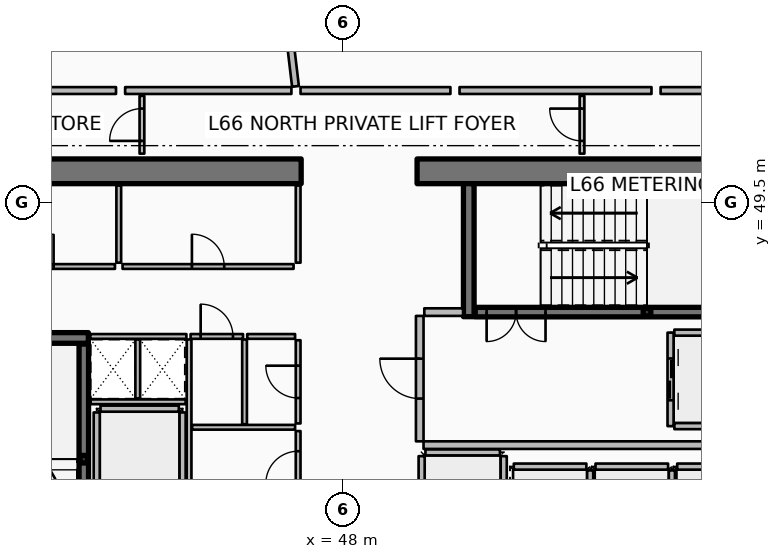
"""IFC4 building model, lengths in metres.
Left out: names, types, materials, properties, quantities, classifications, styles, units other than length and angle.
Written with IfcOpenShell. Run it as: python <this file> out.ifc"""

import sys

from ifc_helpers import new_model, si_unit, direction, frame, frame_2d, origin, origin_2d, place, context, subcontext, project, spatial, rectangle, hollow_rectangle, extrude, element, fill, save


model = new_model("IFC4")
c1 = context("Model", 3, precision=1e-05, world=origin(), true_north=direction((0.0, 1.0)))
c2 = subcontext(c1, "Body", "Model", "MODEL_VIEW")
j1 = project(units=[si_unit("LENGTHUNIT", "METRE"), si_unit("PLANEANGLEUNIT", "RADIAN")], contexts=[c1])
p1 = place(None, origin())
s1 = spatial("IfcSite", under=j1, at=p1, CompositionType="ELEMENT")
p2 = place(p1, origin())
s2 = spatial("IfcBuilding", under=s1, at=p2, CompositionType="ELEMENT")
p3 = place(p2, frame((0.0, 0.0, 263.65)))
s3 = spatial("IfcBuildingStorey", under=s2, at=p3, CompositionType="ELEMENT", Elevation=263.65)
for number, where, z_axis, x_axis in (
    (1, (37.15, 50.325, 0.0), (0.0, 0.0, 1.0), (1.0, 0.0, 0.0)),
    (2, (49.95, 50.325, 0.0), (0.0, 0.0, 1.0), (1.0, 0.0, 0.0)),
):
    element("IfcWall", number, at=place(p3, frame(where, z_axis=z_axis, x_axis=x_axis)), inside=s3, PredefinedType="SHEAR", context=c2, shape_type="SweptSolid", body=[
        extrude(rectangle(XDim=9.75, YDim=0.65, at=frame_2d((4.875, 0.0))), origin(), (0.0, 0.0, 1.0), 3.85),
    ])
for number, where, z_axis, x_axis in (
    (3, (37.8, 45.94, 0.0), (0.0, 0.0, 1.0), (1.0, 0.0, 0.0)),
    (4, (51.31, 46.5, 0.0), (0.0, 0.0, 1.0), (0.0, 1.0, 0.0)),
):
    element("IfcWall", number, at=place(p3, frame(where, z_axis=z_axis, x_axis=x_axis)), inside=s3, PredefinedType="SHEAR", context=c2, shape_type="SweptSolid", body=[
        extrude(rectangle(XDim=3.5, YDim=0.28, at=frame_2d((1.75, 0.0))), origin(), (0.0, 0.0, 1.0), 3.85),
    ])
for number, where, z_axis, x_axis in (
    (5, (41.18, 42.75, 0.0), (0.0, 0.0, 1.0), (1.0, 0.0, 0.0)),
    (6, (56.0, 46.62, 0.0), (0.0, 0.0, 1.0), (1.0, 0.0, 0.0)),
):
    element("IfcColumn", number, at=place(p3, frame(where, z_axis=z_axis, x_axis=x_axis)), inside=s3, PredefinedType="COLUMN", context=c2, shape_type="SweptSolid", body=[
        extrude(hollow_rectangle(XDim=0.2, YDim=0.2, WallThickness=0.01, InnerFilletRadius=0.01, OuterFilletRadius=0.02, at=origin_2d()), origin(), (0.0, 0.0, 1.0), 1.72),
    ])
p4 = place(p3, frame((41.18, 38.22, 0.0), z_axis=(0.0, 0.0, 1.0), x_axis=(0.0, 1.0, 0.0)))
e7 = element("IfcWall", 7, at=p4, inside=s3, PredefinedType="SOLIDWALL", context=c2, shape_type="SweptSolid", body=[
    extrude(rectangle(XDim=7.56, YDim=0.25, at=frame_2d((3.78, 0.0))), origin(), (0.0, 0.0, 1.0), 3.59),
])
p5 = place(p4, frame((0.3, 0.0, 0.0)))
e8 = element("IfcOpeningElement", 8, at=p5, cuts=e7, PredefinedType="OPENING", context=c2, shape_type="SweptSolid", body=[
    extrude(rectangle(XDim=1.55, YDim=2.15, at=frame_2d((0.775, 1.075))), frame((0.0, 0.135, 0.0), z_axis=(0.0, -1.0, 0.0), x_axis=(1.0, 0.0, 0.0)), (0.0, 0.0, 1.0), 0.27),
])
p6 = place(p3, frame((51.48, 46.62, 0.0), z_axis=(0.0, 0.0, 1.0), x_axis=(1.0, 0.0, 0.0)))
e9 = element("IfcWall", 9, at=p6, inside=s3, PredefinedType="SOLIDWALL", context=c2, shape_type="SweptSolid", body=[
    extrude(rectangle(XDim=7.54, YDim=0.25, at=frame_2d((3.77, 0.0))), origin(), (0.0, 0.0, 1.0), 3.59),
])
p7 = place(p6, frame((0.3, 0.0, 0.0)))
e10 = element("IfcOpeningElement", 10, at=p7, cuts=e9, PredefinedType="OPENING", context=c2, shape_type="SweptSolid", body=[
    extrude(rectangle(XDim=1.55, YDim=2.15, at=frame_2d((0.775, 1.075))), frame((0.0, 0.135, 0.0), z_axis=(0.0, -1.0, 0.0), x_axis=(1.0, 0.0, 0.0)), (0.0, 0.0, 1.0), 0.27),
])
p8 = place(p3, frame((54.505, 40.845, 0.0), z_axis=(0.0, 0.0, 1.0), x_axis=(0.0, 1.0, 0.0)))
e11 = element("IfcWall", 11, at=p8, inside=s3, PredefinedType="PARTITIONING", context=c2, shape_type="SweptSolid", body=[
    extrude(rectangle(XDim=1.61, YDim=0.16, at=frame_2d((0.805, 0.0))), origin(), (0.0, 0.0, 1.0), 3.59),
])
p9 = place(p3, frame((52.495, 42.555, 0.0), z_axis=(0.0, 0.0, 1.0), x_axis=(1.0, 0.0, 0.0)))
e12 = element("IfcWall", 12, at=p9, inside=s3, PredefinedType="PARTITIONING", context=c2, shape_type="SweptSolid", body=[
    extrude(rectangle(XDim=1.91, YDim=0.16, at=frame_2d((0.955, 0.0))), origin(), (0.0, 0.0, 1.0), 3.59),
])
p10 = place(p3, frame((56.655, 40.845, 0.0), z_axis=(0.0, 0.0, 1.0), x_axis=(0.0, 1.0, 0.0)))
e13 = element("IfcWall", 13, at=p10, inside=s3, PredefinedType="PARTITIONING", context=c2, shape_type="SweptSolid", body=[
    extrude(rectangle(XDim=1.61, YDim=0.16, at=frame_2d((0.805, 0.0))), origin(), (0.0, 0.0, 1.0), 3.59),
])
p11 = place(p3, frame((54.645, 42.555, 0.0), z_axis=(0.0, 0.0, 1.0), x_axis=(1.0, 0.0, 0.0)))
e14 = element("IfcWall", 14, at=p11, inside=s3, PredefinedType="PARTITIONING", context=c2, shape_type="SweptSolid", body=[
    extrude(rectangle(XDim=1.91, YDim=0.16, at=frame_2d((0.955, 0.0))), origin(), (0.0, 0.0, 1.0), 3.59),
])
p12 = place(p3, frame((56.795, 42.555, 0.0), z_axis=(0.0, 0.0, 1.0), x_axis=(1.0, 0.0, 0.0)))
e15 = element("IfcWall", 15, at=p12, inside=s3, PredefinedType="PARTITIONING", context=c2, shape_type="SweptSolid", body=[
    extrude(rectangle(XDim=1.91, YDim=0.16, at=frame_2d((0.955, 0.0))), origin(), (0.0, 0.0, 1.0), 3.59),
])
for number, where, z_axis, x_axis in (
    (16, (43.78, 41.72, 0.0), (0.0, 0.0, 1.0), (0.0, 1.0, 0.0)),
    (17, (41.52, 41.72, 0.0), (0.0, 0.0, 1.0), (0.0, 1.0, 0.0)),
):
    element("IfcWall", number, at=place(p3, frame(where, z_axis=z_axis, x_axis=x_axis)), inside=s3, PredefinedType="PARTITIONING", context=c2, shape_type="SweptSolid", body=[
        extrude(rectangle(XDim=2.26, YDim=0.16, at=frame_2d((1.13, 0.0))), origin(), (0.0, 0.0, 1.0), 3.59),
    ])
p13 = place(p3, frame((41.62, 44.08, 0.0), z_axis=(0.0, 0.0, 1.0), x_axis=(1.0, 0.0, 0.0)))
e18 = element("IfcWall", 18, at=p13, inside=s3, PredefinedType="PARTITIONING", context=c2, shape_type="SweptSolid", body=[
    extrude(rectangle(XDim=2.06, YDim=0.16, at=frame_2d((1.03, 0.0))), origin(), (0.0, 0.0, 1.0), 3.59),
])
p14 = place(p3, frame((56.62, 46.08, 0.0), z_axis=(0.0, 0.0, 1.0), x_axis=(0.0, -1.0, 0.0)))
e19 = element("IfcWall", 19, at=p14, inside=s3, PredefinedType="PARTITIONING", context=c2, shape_type="SweptSolid", body=[
    extrude(rectangle(XDim=2.46, YDim=0.16, at=frame_2d((1.23, 0.0))), origin(), (0.0, 0.0, 1.0), 3.59),
])
p15 = place(p14, frame((0.68, 0.0, 0.0)))
e20 = element("IfcOpeningElement", 20, at=p15, cuts=e19, PredefinedType="OPENING", context=c2, shape_type="SweptSolid", body=[
    extrude(rectangle(XDim=1.1, YDim=2.1, at=frame_2d((0.55, 1.05))), frame((0.0, 0.09, 0.0), z_axis=(0.0, -1.0, 0.0), x_axis=(1.0, 0.0, 0.0)), (0.0, 0.0, 1.0), 0.18),
])
for number, where, z_axis, x_axis in (
    (21, (56.72, 46.08, 0.0), (0.0, 0.0, 1.0), (1.0, 0.0, 0.0)),
    (22, (56.72, 43.62, 0.0), (0.0, 0.0, 1.0), (1.0, 0.0, 0.0)),
):
    element("IfcWall", number, at=place(p3, frame(where, z_axis=z_axis, x_axis=x_axis)), inside=s3, PredefinedType="PARTITIONING", context=c2, shape_type="SweptSolid", body=[
        extrude(rectangle(XDim=2.06, YDim=0.16, at=frame_2d((1.03, 0.0))), origin(), (0.0, 0.0, 1.0), 3.59),
    ])
for number, where, z_axis, x_axis in (
    (23, (52.23, 40.67, 0.0), (0.0, 0.0, 1.0), (0.0, 1.0, 0.0)),
    (24, (50.07, 40.67, 0.0), (0.0, 0.0, 1.0), (0.0, 1.0, 0.0)),
):
    element("IfcWall", number, at=place(p3, frame(where, z_axis=z_axis, x_axis=x_axis)), inside=s3, PredefinedType="PARTITIONING", context=c2, shape_type="SweptSolid", body=[
        extrude(rectangle(XDim=2.16, YDim=0.16, at=frame_2d((1.08, 0.0))), origin(), (0.0, 0.0, 1.0), 3.59),
    ])
p16 = place(p3, frame((50.17, 42.93, 0.0), z_axis=(0.0, 0.0, 1.0), x_axis=(1.0, 0.0, 0.0)))
e25 = element("IfcWall", 25, at=p16, inside=s3, PredefinedType="PARTITIONING", context=c2, shape_type="SweptSolid", body=[
    extrude(rectangle(XDim=1.96, YDim=0.16, at=frame_2d((0.98, 0.0))), origin(), (0.0, 0.0, 1.0), 3.59),
])
for number, where, z_axis, x_axis in (
    (26, (46.82, 47.92, 0.0), (0.0, 0.0, 1.0), (0.0, 1.0, 0.0)),
    (27, (42.1, 47.92, 0.0), (0.0, 0.0, 1.0), (0.0, 1.0, 0.0)),
):
    element("IfcWall", number, at=place(p3, frame(where, z_axis=z_axis, x_axis=x_axis)), inside=s3, PredefinedType="PARTITIONING", context=c2, shape_type="SweptSolid", body=[
        extrude(rectangle(XDim=2.03, YDim=0.125, at=frame_2d((1.015, 0.0))), origin(), (0.0, 0.0, 1.0), 3.03),
    ])
p17 = place(p3, frame((37.92, 47.82, 0.0), z_axis=(0.0, 0.0, 1.0), x_axis=(1.0, 0.0, 0.0)))
e28 = element("IfcWall", 28, at=p17, inside=s3, PredefinedType="PARTITIONING", context=c2, shape_type="SweptSolid", body=[
    extrude(rectangle(XDim=4.08, YDim=0.125, at=frame_2d((2.04, 0.0))), origin(), (0.0, 0.0, 1.0), 3.03),
])
p18 = place(p17, frame((1.615, 0.0, 0.0)))
e29 = element("IfcOpeningElement", 29, at=p18, cuts=e28, PredefinedType="OPENING", context=c2, shape_type="SweptSolid", body=[
    extrude(rectangle(XDim=0.85, YDim=2.06, at=frame_2d((0.425, 1.03))), frame((0.0, 0.073, 0.0), z_axis=(0.0, -1.0, 0.0), x_axis=(1.0, 0.0, 0.0)), (0.0, 0.0, 1.0), 0.145),
])
p19 = place(p3, frame((42.2, 47.82, 0.0), z_axis=(0.0, 0.0, 1.0), x_axis=(1.0, 0.0, 0.0)))
e30 = element("IfcWall", 30, at=p19, inside=s3, PredefinedType="PARTITIONING", context=c2, shape_type="SweptSolid", body=[
    extrude(rectangle(XDim=4.5, YDim=0.125, at=frame_2d((2.25, 0.0))), origin(), (0.0, 0.0, 1.0), 3.03),
])
p20 = place(p19, frame((1.825, 0.0, 0.0)))
e31 = element("IfcOpeningElement", 31, at=p20, cuts=e30, PredefinedType="OPENING", context=c2, shape_type="SweptSolid", body=[
    extrude(rectangle(XDim=0.85, YDim=2.06, at=frame_2d((0.425, 1.03))), frame((0.0, 0.073, 0.0), z_axis=(0.0, -1.0, 0.0), x_axis=(1.0, 0.0, 0.0)), (0.0, 0.0, 1.0), 0.145),
])
p21 = place(p3, frame((50.12, 43.12, 0.0), z_axis=(0.0, 0.0, 1.0), x_axis=(1.0, 0.0, 0.0)))
e32 = element("IfcWall", 32, at=p21, inside=s3, PredefinedType="PARTITIONING", context=c2, shape_type="SweptSolid", body=[
    extrude(rectangle(XDim=8.88, YDim=0.2, at=frame_2d((4.44, 0.0))), origin(), (0.0, 0.0, 1.0), 3.59),
])
p22 = place(p3, frame((50.14, 46.62, 0.0), z_axis=(0.0, 0.0, 1.0), x_axis=(1.0, 0.0, 0.0)))
e33 = element("IfcWall", 33, at=p22, inside=s3, PredefinedType="PARTITIONING", context=c2, shape_type="SweptSolid", body=[
    extrude(rectangle(XDim=1.02, YDim=0.2, at=frame_2d((0.51, 0.0))), origin(), (0.0, 0.0, 1.0), 3.59),
])
p23 = place(p3, frame((50.02, 43.22, 0.0), z_axis=(0.0, 0.0, 1.0), x_axis=(0.0, 1.0, 0.0)))
e34 = element("IfcWall", 34, at=p23, inside=s3, PredefinedType="PARTITIONING", context=c2, shape_type="SweptSolid", body=[
    extrude(rectangle(XDim=3.3, YDim=0.2, at=frame_2d((1.65, 0.0))), origin(), (0.0, 0.0, 1.0), 3.59),
])
p24 = place(p23, frame((1.125, 0.0, 0.0)))
e35 = element("IfcOpeningElement", 35, at=p24, cuts=e34, PredefinedType="OPENING", context=c2, shape_type="SweptSolid", body=[
    extrude(rectangle(XDim=1.05, YDim=2.1, at=frame_2d((0.525, 1.05))), frame((0.0, 0.11, 0.0), z_axis=(0.0, -1.0, 0.0), x_axis=(1.0, 0.0, 0.0)), (0.0, 0.0, 1.0), 0.22),
])
p25 = place(p3, frame((41.36, 44.26, 0.0), z_axis=(0.0, 0.0, 1.0), x_axis=(1.0, 0.0, 0.0)))
e36 = element("IfcWall", 36, at=p25, inside=s3, PredefinedType="PARTITIONING", context=c2, shape_type="SweptSolid", body=[
    extrude(rectangle(XDim=2.5, YDim=0.125, at=frame_2d((1.25, 0.0))), origin(), (0.0, 0.0, 1.0), 3.03),
])
p26 = place(p3, frame((42.6, 44.35, 0.0), z_axis=(0.0, 0.0, 1.0), x_axis=(0.0, 1.0, 0.0)))
e37 = element("IfcWall", 37, at=p26, inside=s3, PredefinedType="PARTITIONING", context=c2, shape_type="SweptSolid", body=[
    extrude(rectangle(XDim=1.55, YDim=0.125, at=frame_2d((0.775, 0.0))), origin(), (0.0, 0.0, 1.0), 3.03),
])
p27 = place(p3, frame((43.95, 41.58, 0.0), z_axis=(0.0, 0.0, 1.0), x_axis=(0.0, 1.0, 0.0)))
e38 = element("IfcWall", 38, at=p27, inside=s3, PredefinedType="PARTITIONING", context=c2, shape_type="SweptSolid", body=[
    extrude(rectangle(XDim=4.32, YDim=0.125, at=frame_2d((2.16, 0.0))), origin(), (0.0, 0.0, 1.0), 3.03),
])
p28 = place(p3, frame((44.03, 43.59, 0.0), z_axis=(0.0, 0.0, 1.0), x_axis=(1.0, 0.0, 0.0)))
e39 = element("IfcWall", 39, at=p28, inside=s3, PredefinedType="PARTITIONING", context=c2, shape_type="SweptSolid", body=[
    extrude(rectangle(XDim=2.71, YDim=0.125, at=frame_2d((1.355, 0.0))), origin(), (0.0, 0.0, 1.0), 3.03),
])
p29 = place(p3, frame((45.41, 43.67, 0.0), z_axis=(0.0, 0.0, 1.0), x_axis=(0.0, 1.0, 0.0)))
e40 = element("IfcWall", 40, at=p29, inside=s3, PredefinedType="PARTITIONING", context=c2, shape_type="SweptSolid", body=[
    extrude(rectangle(XDim=2.23, YDim=0.125, at=frame_2d((1.115, 0.0))), origin(), (0.0, 0.0, 1.0), 3.03),
])
p30 = place(p3, frame((46.82, 41.58, 0.0), z_axis=(0.0, 0.0, 1.0), x_axis=(0.0, 1.0, 0.0)))
e41 = element("IfcWall", 41, at=p30, inside=s3, PredefinedType="PARTITIONING", context=c2, shape_type="SweptSolid", body=[
    extrude(rectangle(XDim=1.91, YDim=0.125, at=frame_2d((0.955, 0.0))), origin(), (0.0, 0.0, 1.0), 3.03),
])
p31 = place(p30, frame((0.53, 0.0, 0.0)))
e42 = element("IfcOpeningElement", 42, at=p31, cuts=e41, PredefinedType="OPENING", context=c2, shape_type="SweptSolid", body=[
    extrude(rectangle(XDim=0.85, YDim=2.06, at=frame_2d((0.425, 1.03))), frame((0.0, 0.073, 0.0), z_axis=(0.0, -1.0, 0.0), x_axis=(1.0, 0.0, 0.0)), (0.0, 0.0, 1.0), 0.145),
])
p32 = place(p3, frame((46.82, 43.69, 0.0), z_axis=(0.0, 0.0, 1.0), x_axis=(0.0, 1.0, 0.0)))
e43 = element("IfcWall", 43, at=p32, inside=s3, PredefinedType="PARTITIONING", context=c2, shape_type="SweptSolid", body=[
    extrude(rectangle(XDim=2.19, YDim=0.125, at=frame_2d((1.095, 0.0))), origin(), (0.0, 0.0, 1.0), 3.03),
])
p33 = place(p32, frame((0.67, 0.0, 0.0)))
e44 = element("IfcOpeningElement", 44, at=p33, cuts=e43, PredefinedType="OPENING", context=c2, shape_type="SweptSolid", body=[
    extrude(rectangle(XDim=0.85, YDim=2.06, at=frame_2d((0.425, 1.03))), frame((0.0, 0.073, 0.0), z_axis=(0.0, -1.0, 0.0), x_axis=(1.0, 0.0, 0.0)), (0.0, 0.0, 1.0), 0.145),
])
p34 = place(p3, frame((41.35, 45.98, 0.0), z_axis=(0.0, 0.0, 1.0), x_axis=(1.0, 0.0, 0.0)))
e45 = element("IfcWall", 45, at=p34, inside=s3, PredefinedType="PARTITIONING", context=c2, shape_type="SweptSolid", body=[
    extrude(rectangle(XDim=2.53, YDim=0.125, at=frame_2d((1.265, 0.0))), origin(), (0.0, 0.0, 1.0), 3.03),
])
p35 = place(p3, frame((43.99, 45.98, 0.0), z_axis=(0.0, 0.0, 1.0), x_axis=(1.0, 0.0, 0.0)))
e46 = element("IfcWall", 46, at=p35, inside=s3, PredefinedType="PARTITIONING", context=c2, shape_type="SweptSolid", body=[
    extrude(rectangle(XDim=1.38, YDim=0.125, at=frame_2d((0.69, 0.0))), origin(), (0.0, 0.0, 1.0), 3.03),
])
p36 = place(p35, frame((0.265, 0.0, 0.0)))
e47 = element("IfcOpeningElement", 47, at=p36, cuts=e46, PredefinedType="OPENING", context=c2, shape_type="SweptSolid", body=[
    extrude(rectangle(XDim=0.85, YDim=2.06, at=frame_2d((0.425, 1.03))), frame((0.0, 0.073, 0.0), z_axis=(0.0, -1.0, 0.0), x_axis=(1.0, 0.0, 0.0)), (0.0, 0.0, 1.0), 0.145),
])
p37 = place(p3, frame((45.48, 45.98, 0.0), z_axis=(0.0, 0.0, 1.0), x_axis=(1.0, 0.0, 0.0)))
e48 = element("IfcWall", 48, at=p37, inside=s3, PredefinedType="PARTITIONING", context=c2, shape_type="SweptSolid", body=[
    extrude(rectangle(XDim=1.26, YDim=0.125, at=frame_2d((0.63, 0.0))), origin(), (0.0, 0.0, 1.0), 3.03),
])
p38 = place(p3, frame((42.71, 50.79, 0.0), z_axis=(0.0, 0.0, 1.0), x_axis=(0.0, 1.0, 0.0)))
e49 = element("IfcWall", 49, at=p38, inside=s3, PredefinedType="PARTITIONING", context=c2, shape_type="SweptSolid", body=[
    extrude(rectangle(XDim=1.52, YDim=0.125, at=frame_2d((0.76, 0.0))), origin(), (0.0, 0.0, 1.0), 2.957),
])
p39 = place(p38, frame((0.335, 0.0, 0.0)))
e50 = element("IfcOpeningElement", 50, at=p39, cuts=e49, PredefinedType="OPENING", context=c2, shape_type="SweptSolid", body=[
    extrude(rectangle(XDim=0.85, YDim=2.06, at=frame_2d((0.425, 1.03))), frame((0.0, 0.073, 0.0), z_axis=(0.0, -1.0, 0.0), x_axis=(1.0, 0.0, 0.0)), (0.0, 0.0, 1.0), 0.145),
])
p40 = place(p3, frame((54.29, 50.79, 0.0), z_axis=(0.0, 0.0, 1.0), x_axis=(0.0, 1.0, 0.0)))
e51 = element("IfcWall", 51, at=p40, inside=s3, PredefinedType="PARTITIONING", context=c2, shape_type="SweptSolid", body=[
    extrude(rectangle(XDim=1.52, YDim=0.125, at=frame_2d((0.76, 0.0))), origin(), (0.0, 0.0, 1.0), 3.03),
])
p41 = place(p40, frame((0.335, 0.0, 0.0)))
e52 = element("IfcOpeningElement", 52, at=p41, cuts=e51, PredefinedType="OPENING", context=c2, shape_type="SweptSolid", body=[
    extrude(rectangle(XDim=0.85, YDim=2.06, at=frame_2d((0.425, 1.03))), frame((0.0, 0.073, 0.0), z_axis=(0.0, -1.0, 0.0), x_axis=(1.0, 0.0, 0.0)), (0.0, 0.0, 1.0), 0.145),
])
p42 = place(p3, frame((46.75, 52.559, 0.0), z_axis=(0.0, 0.0, 1.0), x_axis=(-0.117540318076, 0.993068111273, 0.0)))
e53 = element("IfcWall", 53, at=p42, inside=s3, PredefinedType="PARTITIONING", context=c2, shape_type="SweptSolid", body=[
    extrude(rectangle(XDim=14.062, YDim=0.18, at=frame_2d((7.031, 0.0))), origin(), (0.0, 0.0, 1.0), 2.957),
])
p43 = place(p3, frame((46.643, 52.45, 0.0), z_axis=(0.0, 0.0, 1.0), x_axis=(-1.0, 0.0, 0.0)))
e54 = element("IfcWall", 54, at=p43, inside=s3, PredefinedType="PARTITIONING", context=c2, shape_type="SweptSolid", body=[
    extrude(rectangle(XDim=4.376, YDim=0.18, at=frame_2d((2.188, 0.0))), origin(), (0.0, 0.0, 1.0), 2.957),
])
p44 = place(p3, frame((42.028, 52.45, 0.0), z_axis=(0.0, 0.0, 1.0), x_axis=(-1.0, 0.0, 0.0)))
e55 = element("IfcWall", 55, at=p44, inside=s3, PredefinedType="PARTITIONING", context=c2, shape_type="SweptSolid", body=[
    extrude(rectangle(XDim=4.758, YDim=0.18, at=frame_2d((2.379, 0.0))), origin(), (0.0, 0.0, 1.0), 2.957),
])
p45 = place(p3, frame((59.58, 52.45, 0.0), z_axis=(0.0, 0.0, 1.0), x_axis=(-1.0, 0.0, 0.0)))
e56 = element("IfcWall", 56, at=p45, inside=s3, PredefinedType="PARTITIONING", context=c2, shape_type="SweptSolid", body=[
    extrude(rectangle(XDim=3.222, YDim=0.18, at=frame_2d((1.611, 0.0))), origin(), (0.0, 0.0, 1.0), 2.957),
])
p46 = place(p3, frame((56.118, 52.45, 0.0), z_axis=(0.0, 0.0, 1.0), x_axis=(-1.0, 0.0, 0.0)))
e57 = element("IfcWall", 57, at=p46, inside=s3, PredefinedType="PARTITIONING", context=c2, shape_type="SweptSolid", body=[
    extrude(rectangle(XDim=5.051, YDim=0.18, at=frame_2d((2.525, 0.0))), origin(), (0.0, 0.0, 1.0), 2.957),
])
p47 = place(p3, frame((50.827, 52.45, 0.0), z_axis=(0.0, 0.0, 1.0), x_axis=(-1.0, 0.0, 0.0)))
e58 = element("IfcWall", 58, at=p47, inside=s3, PredefinedType="PARTITIONING", context=c2, shape_type="SweptSolid", body=[
    extrude(rectangle(XDim=3.944, YDim=0.18, at=frame_2d((1.972, 0.0))), origin(), (0.0, 0.0, 1.0), 2.957),
])
p48 = place(p7, origin())
e59 = element("IfcDoor", 59, at=p48, inside=s3, OperationType="DOUBLE_DOOR_SINGLE_SWING", PredefinedType="DOOR", context=c2, shape_type="SweptSolid", body=[
    extrude(rectangle(XDim=1.55, YDim=2.15, at=frame_2d((0.775, 1.075))), frame((0.0, 0.025, 0.0), z_axis=(0.0, -1.0, 0.0), x_axis=(1.0, 0.0, 0.0)), (0.0, 0.0, 1.0), 0.05),
])
fill(e10, e59)
p49 = place(p15, origin())
e60 = element("IfcDoor", 60, at=p49, inside=s3, OperationType="DOUBLE_DOOR_SLIDING", PredefinedType="DOOR", context=c2, shape_type="SweptSolid", body=[
    extrude(rectangle(XDim=1.1, YDim=2.1, at=frame_2d((0.55, 1.05))), frame((0.0, 0.025, 0.0), z_axis=(0.0, -1.0, 0.0), x_axis=(1.0, 0.0, 0.0)), (0.0, 0.0, 1.0), 0.05),
])
fill(e20, e60)
p50 = place(p18, origin())
e61 = element("IfcDoor", 61, at=p50, inside=s3, OperationType="SINGLE_SWING_RIGHT", PredefinedType="DOOR", context=c2, shape_type="SweptSolid", body=[
    extrude(rectangle(XDim=0.85, YDim=2.06, at=frame_2d((0.425, 1.03))), frame((0.0, 0.025, 0.0), z_axis=(0.0, -1.0, 0.0), x_axis=(1.0, 0.0, 0.0)), (0.0, 0.0, 1.0), 0.05),
])
fill(e29, e61)
p51 = place(p20, origin())
e62 = element("IfcDoor", 62, at=p51, inside=s3, OperationType="SINGLE_SWING_LEFT", PredefinedType="DOOR", context=c2, shape_type="SweptSolid", body=[
    extrude(rectangle(XDim=0.85, YDim=2.06, at=frame_2d((0.425, 1.03))), frame((0.0, 0.025, 0.0), z_axis=(0.0, -1.0, 0.0), x_axis=(1.0, 0.0, 0.0)), (0.0, 0.0, 1.0), 0.05),
])
fill(e31, e62)
p52 = place(p24, origin())
e63 = element("IfcDoor", 63, at=p52, inside=s3, OperationType="SINGLE_SWING_RIGHT", PredefinedType="DOOR", context=c2, shape_type="SweptSolid", body=[
    extrude(rectangle(XDim=1.05, YDim=2.1, at=frame_2d((0.525, 1.05))), frame((0.0, 0.025, 0.0), z_axis=(0.0, -1.0, 0.0), x_axis=(1.0, 0.0, 0.0)), (0.0, 0.0, 1.0), 0.05),
])
fill(e35, e63)
p53 = place(p31, origin())
e64 = element("IfcDoor", 64, at=p53, inside=s3, OperationType="SINGLE_SWING_LEFT", PredefinedType="DOOR", context=c2, shape_type="SweptSolid", body=[
    extrude(rectangle(XDim=0.85, YDim=2.06, at=frame_2d((0.425, 1.03))), frame((0.0, 0.025, 0.0), z_axis=(0.0, -1.0, 0.0), x_axis=(1.0, 0.0, 0.0)), (0.0, 0.0, 1.0), 0.05),
])
fill(e42, e64)
p54 = place(p33, origin())
e65 = element("IfcDoor", 65, at=p54, inside=s3, OperationType="SINGLE_SWING_RIGHT", PredefinedType="DOOR", context=c2, shape_type="SweptSolid", body=[
    extrude(rectangle(XDim=0.85, YDim=2.06, at=frame_2d((0.425, 1.03))), frame((0.0, 0.025, 0.0), z_axis=(0.0, -1.0, 0.0), x_axis=(1.0, 0.0, 0.0)), (0.0, 0.0, 1.0), 0.05),
])
fill(e44, e65)
p55 = place(p36, origin())
e66 = element("IfcDoor", 66, at=p55, inside=s3, OperationType="SINGLE_SWING_LEFT", PredefinedType="DOOR", context=c2, shape_type="SweptSolid", body=[
    extrude(rectangle(XDim=0.85, YDim=2.06, at=frame_2d((0.425, 1.03))), frame((0.0, 0.025, 0.0), z_axis=(0.0, -1.0, 0.0), x_axis=(1.0, 0.0, 0.0)), (0.0, 0.0, 1.0), 0.05),
])
fill(e47, e66)
p56 = place(p39, origin())
e67 = element("IfcDoor", 67, at=p56, inside=s3, OperationType="SINGLE_SWING_LEFT", PredefinedType="DOOR", context=c2, shape_type="SweptSolid", body=[
    extrude(rectangle(XDim=0.85, YDim=2.06, at=frame_2d((0.425, 1.03))), frame((0.0, 0.025, 0.0), z_axis=(0.0, -1.0, 0.0), x_axis=(1.0, 0.0, 0.0)), (0.0, 0.0, 1.0), 0.05),
])
fill(e50, e67)
p57 = place(p41, origin())
e68 = element("IfcDoor", 68, at=p57, inside=s3, OperationType="SINGLE_SWING_RIGHT", PredefinedType="DOOR", context=c2, shape_type="SweptSolid", body=[
    extrude(rectangle(XDim=0.85, YDim=2.06, at=frame_2d((0.425, 1.03))), frame((0.0, 0.025, 0.0), z_axis=(0.0, -1.0, 0.0), x_axis=(1.0, 0.0, 0.0)), (0.0, 0.0, 1.0), 0.05),
])
fill(e52, e68)
save(model, sys.argv[1])
